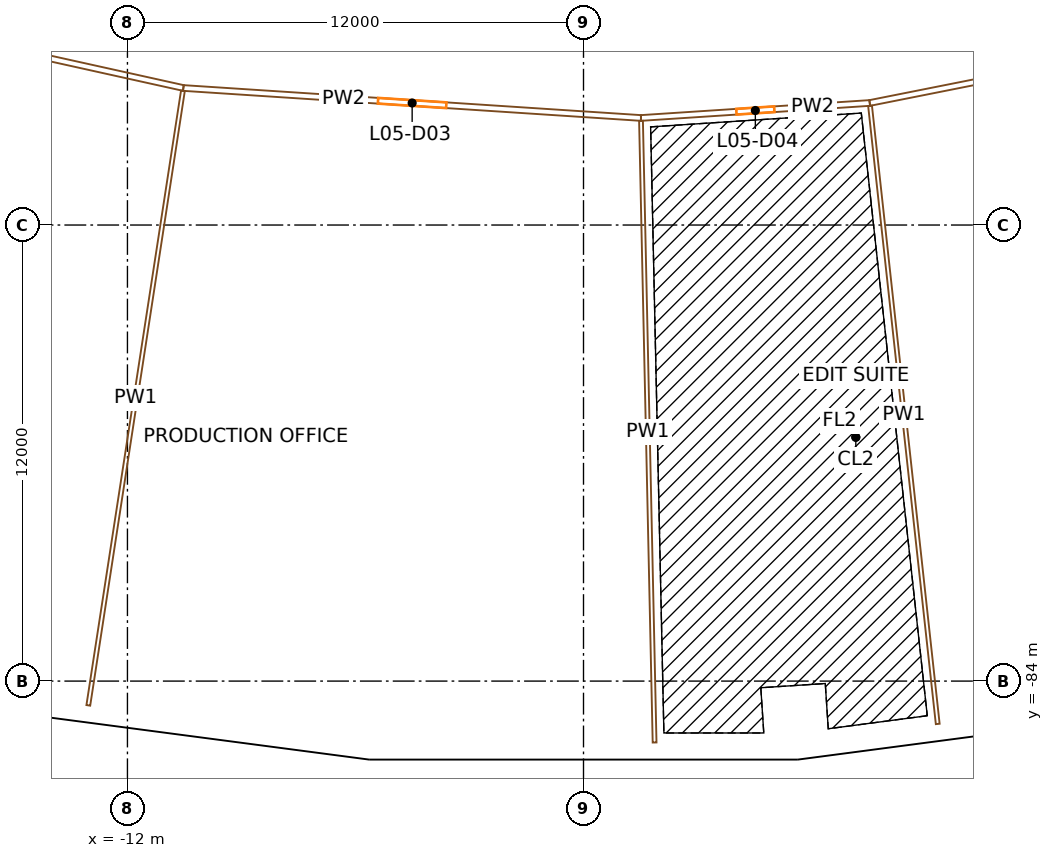
"""IFC4 building model, lengths in metres.
Left out: names, types, materials, properties, quantities, classifications, styles, units other than length and angle.
Written with IfcOpenShell. Run it as: python <this file> out.ifc"""

import sys

from ifc_helpers import new_model, si_unit, direction, frame, frame_2d, origin, origin_2d, place, context, subcontext, project, spatial, rectangle, extrude, element, fill, save


model = new_model("IFC4")
c1 = context("Model", 3, precision=1e-05, world=origin(), true_north=direction((0.0, 1.0)))
c2 = subcontext(c1, "Body", "Model", "MODEL_VIEW")
j1 = project(units=[si_unit("LENGTHUNIT", "METRE"), si_unit("PLANEANGLEUNIT", "RADIAN")], contexts=[c1])
p1 = place(None, origin())
s1 = spatial("IfcSite", under=j1, at=p1, CompositionType="ELEMENT")
p2 = place(p1, origin())
s2 = spatial("IfcBuilding", under=s1, at=p2, CompositionType="ELEMENT")
p3 = place(p2, frame((0.0, 0.0, 36.0)))
s3 = spatial("IfcBuildingStorey", under=s2, at=p3, CompositionType="ELEMENT", Elevation=36.0)
p4 = place(p3, frame((-5.085, -77.583, 0.0), z_axis=(0.0, 0.0, 1.0), x_axis=(0.997858923239, -0.06540312923, 0.0)))
e1 = element("IfcColumn", 1, at=p4, inside=s3, PredefinedType="COLUMN", context=c2, shape_type="SweptSolid", body=[
    extrude(rectangle(XDim=1.4, YDim=1.8, at=origin_2d()), origin(), (0.0, 0.0, 1.0), 4.5),
])
p5 = place(p3, frame((-5.576, -85.067, 0.0), z_axis=(0.0, 0.0, 1.0), x_axis=(0.997858923239, -0.06540312923, 0.0)))
e2 = element("IfcColumn", 2, at=p5, inside=s3, PredefinedType="COLUMN", context=c2, shape_type="SweptSolid", body=[
    extrude(rectangle(XDim=1.1, YDim=1.3, at=origin_2d()), origin(), (0.0, 0.0, 1.0), 4.5),
])
p6 = place(p3, frame((5.085, -77.583, 0.0), z_axis=(0.0, 0.0, 1.0), x_axis=(0.997858923239, 0.06540312923, 0.0)))
e3 = element("IfcColumn", 3, at=p6, inside=s3, PredefinedType="COLUMN", context=c2, shape_type="SweptSolid", body=[
    extrude(rectangle(XDim=1.4, YDim=1.8, at=origin_2d()), origin(), (0.0, 0.0, 1.0), 4.5),
])
p7 = place(p3, frame((5.576, -85.067, 0.0), z_axis=(0.0, 0.0, 1.0), x_axis=(0.997858923239, 0.06540312923, 0.0)))
e4 = element("IfcColumn", 4, at=p7, inside=s3, PredefinedType="COLUMN", context=c2, shape_type="SweptSolid", body=[
    extrude(rectangle(XDim=1.1, YDim=1.3, at=origin_2d()), origin(), (0.0, 0.0, 1.0), 4.5),
])
p8 = place(p3, frame((-5.656, -85.84, 0.0), z_axis=(0.0, 0.0, 1.0), x_axis=(1.0, 0.0, 0.0)))
e5 = element("IfcWall", 5, at=p8, inside=s3, PredefinedType="SOLIDWALL", context=c2, shape_type="SweptSolid", body=[
    extrude(rectangle(XDim=11.312, YDim=0.45, at=frame_2d((5.656, 0.0))), origin(), (0.0, 0.0, 1.0), 3.2),
])
p9 = place(p8, frame((4.006, 0.0, 0.9)))
e6 = element("IfcOpeningElement", 6, at=p9, cuts=e5, PredefinedType="OPENING", context=c2, shape_type="SweptSolid", body=[
    extrude(rectangle(XDim=1.2, YDim=2.15, at=frame_2d((0.6, 1.075))), frame((0.0, 0.235, 0.0), z_axis=(0.0, -1.0, 0.0), x_axis=(1.0, 0.0, 0.0)), (0.0, 0.0, 1.0), 0.47),
])
p10 = place(p8, frame((6.106, 0.0, 0.9)))
e7 = element("IfcOpeningElement", 7, at=p10, cuts=e5, PredefinedType="OPENING", context=c2, shape_type="SweptSolid", body=[
    extrude(rectangle(XDim=1.2, YDim=2.15, at=frame_2d((0.6, 1.075))), frame((0.0, 0.235, 0.0), z_axis=(0.0, -1.0, 0.0), x_axis=(1.0, 0.0, 0.0)), (0.0, 0.0, 1.0), 0.47),
])
p11 = place(p3, frame((5.685, -85.833, 0.0), z_axis=(0.0, 0.0, 1.0), x_axis=(0.991447502826, 0.130506126829, 0.0)))
e8 = element("IfcWall", 8, at=p11, inside=s3, PredefinedType="SOLIDWALL", context=c2, shape_type="SweptSolid", body=[
    extrude(rectangle(XDim=11.135, YDim=0.45, at=frame_2d((5.567, 0.0))), origin(), (0.0, 0.0, 1.0), 3.2),
])
p12 = place(p11, frame((3.917, 0.0, 0.9)))
e9 = element("IfcOpeningElement", 9, at=p12, cuts=e8, PredefinedType="OPENING", context=c2, shape_type="SweptSolid", body=[
    extrude(rectangle(XDim=1.2, YDim=2.15, at=frame_2d((0.6, 1.075))), frame((0.0, 0.235, 0.0), z_axis=(0.0, -1.0, 0.0), x_axis=(1.0, 0.0, 0.0)), (0.0, 0.0, 1.0), 0.47),
])
p13 = place(p11, frame((6.017, 0.0, 0.9)))
e10 = element("IfcOpeningElement", 10, at=p13, cuts=e8, PredefinedType="OPENING", context=c2, shape_type="SweptSolid", body=[
    extrude(rectangle(XDim=1.2, YDim=2.15, at=frame_2d((0.6, 1.075))), frame((0.0, 0.235, 0.0), z_axis=(0.0, -1.0, 0.0), x_axis=(1.0, 0.0, 0.0)), (0.0, 0.0, 1.0), 0.47),
])
p14 = place(p3, frame((-16.724, -84.379, 0.0), z_axis=(0.0, 0.0, 1.0), x_axis=(0.991447502826, -0.130506126829, 0.0)))
e11 = element("IfcWall", 11, at=p14, inside=s3, PredefinedType="SOLIDWALL", context=c2, shape_type="SweptSolid", body=[
    extrude(rectangle(XDim=11.135, YDim=0.45, at=frame_2d((5.567, 0.0))), origin(), (0.0, 0.0, 1.0), 3.2),
])
p15 = place(p14, frame((3.917, 0.0, 0.9)))
e12 = element("IfcOpeningElement", 12, at=p15, cuts=e11, PredefinedType="OPENING", context=c2, shape_type="SweptSolid", body=[
    extrude(rectangle(XDim=1.2, YDim=2.15, at=frame_2d((0.6, 1.075))), frame((0.0, 0.235, 0.0), z_axis=(0.0, -1.0, 0.0), x_axis=(1.0, 0.0, 0.0)), (0.0, 0.0, 1.0), 0.47),
])
p16 = place(p14, frame((6.017, 0.0, 0.9)))
e13 = element("IfcOpeningElement", 13, at=p16, cuts=e11, PredefinedType="OPENING", context=c2, shape_type="SweptSolid", body=[
    extrude(rectangle(XDim=1.2, YDim=2.15, at=frame_2d((0.6, 1.075))), frame((0.0, 0.235, 0.0), z_axis=(0.0, -1.0, 0.0), x_axis=(1.0, 0.0, 0.0)), (0.0, 0.0, 1.0), 0.47),
])
p17 = place(p3, frame((-10.529, -68.394, 0.0), z_axis=(0.0, 0.0, 1.0), x_axis=(-0.976288493125, 0.216473504595, 0.0)))
e14 = element("IfcWall", 14, at=p17, inside=s3, PredefinedType="PARTITIONING", context=c2, shape_type="SweptSolid", body=[
    extrude(rectangle(XDim=9.052, YDim=0.15, at=frame_2d((4.526, 0.0))), origin(), (0.0, 0.0, 1.0), 3.1),
])
p18 = place(p17, frame((3.626, 0.0, 0.0)))
e15 = element("IfcOpeningElement", 15, at=p18, cuts=e14, PredefinedType="OPENING", context=c2, shape_type="SweptSolid", body=[
    extrude(rectangle(XDim=1.8, YDim=2.1, at=frame_2d((0.9, 1.05))), frame((0.0, 0.085, 0.0), z_axis=(0.0, -1.0, 0.0), x_axis=(1.0, 0.0, 0.0)), (0.0, 0.0, 1.0), 0.17),
])
p19 = place(p3, frame((-13.03, -84.639, 0.0), z_axis=(0.0, 0.0, 1.0), x_axis=(0.15214688942, 0.988357892689, 0.0)))
e16 = element("IfcWall", 16, at=p19, inside=s3, PredefinedType="PARTITIONING", context=c2, shape_type="SweptSolid", body=[
    extrude(rectangle(XDim=16.361, YDim=0.1, at=frame_2d((8.18, 0.0))), origin(), (0.0, 0.0, 1.0), 3.1),
])
p20 = place(p3, frame((1.511, -69.184, 0.0), z_axis=(0.0, 0.0, 1.0), x_axis=(-0.997858140049, 0.065415077291, 0.0)))
e17 = element("IfcWall", 17, at=p20, inside=s3, PredefinedType="PARTITIONING", context=c2, shape_type="SweptSolid", body=[
    extrude(rectangle(XDim=12.066, YDim=0.15, at=frame_2d((6.033, 0.0))), origin(), (0.0, 0.0, 1.0), 3.1),
])
p21 = place(p20, frame((5.133, 0.0, 0.0)))
e18 = element("IfcOpeningElement", 18, at=p21, cuts=e17, PredefinedType="OPENING", context=c2, shape_type="SweptSolid", body=[
    extrude(rectangle(XDim=1.8, YDim=2.1, at=frame_2d((0.9, 1.05))), frame((0.0, 0.085, 0.0), z_axis=(0.0, -1.0, 0.0), x_axis=(1.0, 0.0, 0.0)), (0.0, 0.0, 1.0), 0.17),
])
p22 = place(p3, frame((7.532, -68.789, 0.0), z_axis=(0.0, 0.0, 1.0), x_axis=(-0.997856905736, -0.065433903101, 0.0)))
e19 = element("IfcWall", 19, at=p22, inside=s3, PredefinedType="PARTITIONING", context=c2, shape_type="SweptSolid", body=[
    extrude(rectangle(XDim=6.033, YDim=0.15, at=frame_2d((3.017, 0.0))), origin(), (0.0, 0.0, 1.0), 3.1),
])
p23 = place(p22, frame((2.517, 0.0, 0.0)))
e20 = element("IfcOpeningElement", 20, at=p23, cuts=e19, PredefinedType="OPENING", context=c2, shape_type="SweptSolid", body=[
    extrude(rectangle(XDim=1.0, YDim=2.1, at=frame_2d((0.5, 1.05))), frame((0.0, 0.085, 0.0), z_axis=(0.0, -1.0, 0.0), x_axis=(1.0, 0.0, 0.0)), (0.0, 0.0, 1.0), 0.17),
])
p24 = place(p3, frame((1.871, -85.615, 0.0), z_axis=(0.0, 0.0, 1.0), x_axis=(-0.021846183574, 0.999761343653, 0.0)))
e21 = element("IfcWall", 21, at=p24, inside=s3, PredefinedType="PARTITIONING", context=c2, shape_type="SweptSolid", body=[
    extrude(rectangle(XDim=16.361, YDim=0.1, at=frame_2d((8.18, 0.0))), origin(), (0.0, 0.0, 1.0), 3.1),
])
p25 = place(p3, frame((19.366, -66.435, 0.0), z_axis=(0.0, 0.0, 1.0), x_axis=(-0.980784812657, -0.195092673522, 0.0)))
e22 = element("IfcWall", 22, at=p25, inside=s3, PredefinedType="PARTITIONING", context=c2, shape_type="SweptSolid", body=[
    extrude(rectangle(XDim=12.066, YDim=0.15, at=frame_2d((6.033, 0.0))), origin(), (0.0, 0.0, 1.0), 3.1),
])
p26 = place(p25, frame((5.133, 0.0, 0.0)))
e23 = element("IfcOpeningElement", 23, at=p26, cuts=e22, PredefinedType="OPENING", context=c2, shape_type="SweptSolid", body=[
    extrude(rectangle(XDim=1.8, YDim=2.1, at=frame_2d((0.9, 1.05))), frame((0.0, 0.085, 0.0), z_axis=(0.0, -1.0, 0.0), x_axis=(1.0, 0.0, 0.0)), (0.0, 0.0, 1.0), 0.17),
])
p27 = place(p3, frame((9.321, -85.127, 0.0), z_axis=(0.0, 0.0, 1.0), x_axis=(-0.1088427139, 0.99405898398, 0.0)))
e24 = element("IfcWall", 24, at=p27, inside=s3, PredefinedType="PARTITIONING", context=c2, shape_type="SweptSolid", body=[
    extrude(rectangle(XDim=16.361, YDim=0.1, at=frame_2d((8.18, 0.0))), origin(), (0.0, 0.0, 1.0), 3.1),
])
p28 = place(p15, origin())
e25 = element("IfcWindow", 25, at=p28, inside=s3, PartitioningType="SINGLE_PANEL", PredefinedType="WINDOW", context=c2, shape_type="SweptSolid", body=[
    extrude(rectangle(XDim=1.2, YDim=2.15, at=frame_2d((0.6, 1.075))), frame((0.0, 0.03, 0.0), z_axis=(0.0, -1.0, 0.0), x_axis=(1.0, 0.0, 0.0)), (0.0, 0.0, 1.0), 0.06),
])
fill(e12, e25)
p29 = place(p16, origin())
e26 = element("IfcWindow", 26, at=p29, inside=s3, PartitioningType="SINGLE_PANEL", PredefinedType="WINDOW", context=c2, shape_type="SweptSolid", body=[
    extrude(rectangle(XDim=1.2, YDim=2.15, at=frame_2d((0.6, 1.075))), frame((0.0, 0.03, 0.0), z_axis=(0.0, -1.0, 0.0), x_axis=(1.0, 0.0, 0.0)), (0.0, 0.0, 1.0), 0.06),
])
fill(e13, e26)
p30 = place(p9, origin())
e27 = element("IfcWindow", 27, at=p30, inside=s3, PartitioningType="SINGLE_PANEL", PredefinedType="WINDOW", context=c2, shape_type="SweptSolid", body=[
    extrude(rectangle(XDim=1.2, YDim=2.15, at=frame_2d((0.6, 1.075))), frame((0.0, 0.03, 0.0), z_axis=(0.0, -1.0, 0.0), x_axis=(1.0, 0.0, 0.0)), (0.0, 0.0, 1.0), 0.06),
])
fill(e6, e27)
p31 = place(p10, origin())
e28 = element("IfcWindow", 28, at=p31, inside=s3, PartitioningType="SINGLE_PANEL", PredefinedType="WINDOW", context=c2, shape_type="SweptSolid", body=[
    extrude(rectangle(XDim=1.2, YDim=2.15, at=frame_2d((0.6, 1.075))), frame((0.0, 0.03, 0.0), z_axis=(0.0, -1.0, 0.0), x_axis=(1.0, 0.0, 0.0)), (0.0, 0.0, 1.0), 0.06),
])
fill(e7, e28)
p32 = place(p12, origin())
e29 = element("IfcWindow", 29, at=p32, inside=s3, PartitioningType="SINGLE_PANEL", PredefinedType="WINDOW", context=c2, shape_type="SweptSolid", body=[
    extrude(rectangle(XDim=1.2, YDim=2.15, at=frame_2d((0.6, 1.075))), frame((0.0, 0.03, 0.0), z_axis=(0.0, -1.0, 0.0), x_axis=(1.0, 0.0, 0.0)), (0.0, 0.0, 1.0), 0.06),
])
fill(e9, e29)
p33 = place(p21, origin())
e30 = element("IfcDoor", 30, at=p33, inside=s3, OperationType="DOUBLE_DOOR_SINGLE_SWING", PredefinedType="DOOR", context=c2, shape_type="SweptSolid", body=[
    extrude(rectangle(XDim=1.8, YDim=2.1, at=frame_2d((0.9, 1.05))), frame((0.0, 0.025, 0.0), z_axis=(0.0, -1.0, 0.0), x_axis=(1.0, 0.0, 0.0)), (0.0, 0.0, 1.0), 0.05),
])
fill(e18, e30)
p34 = place(p23, origin())
e31 = element("IfcDoor", 31, at=p34, inside=s3, OperationType="SINGLE_SWING_RIGHT", PredefinedType="DOOR", context=c2, shape_type="SweptSolid", body=[
    extrude(rectangle(XDim=1.0, YDim=2.1, at=frame_2d((0.5, 1.05))), frame((0.0, 0.025, 0.0), z_axis=(0.0, -1.0, 0.0), x_axis=(1.0, 0.0, 0.0)), (0.0, 0.0, 1.0), 0.05),
])
fill(e20, e31)
save(model, sys.argv[1])
